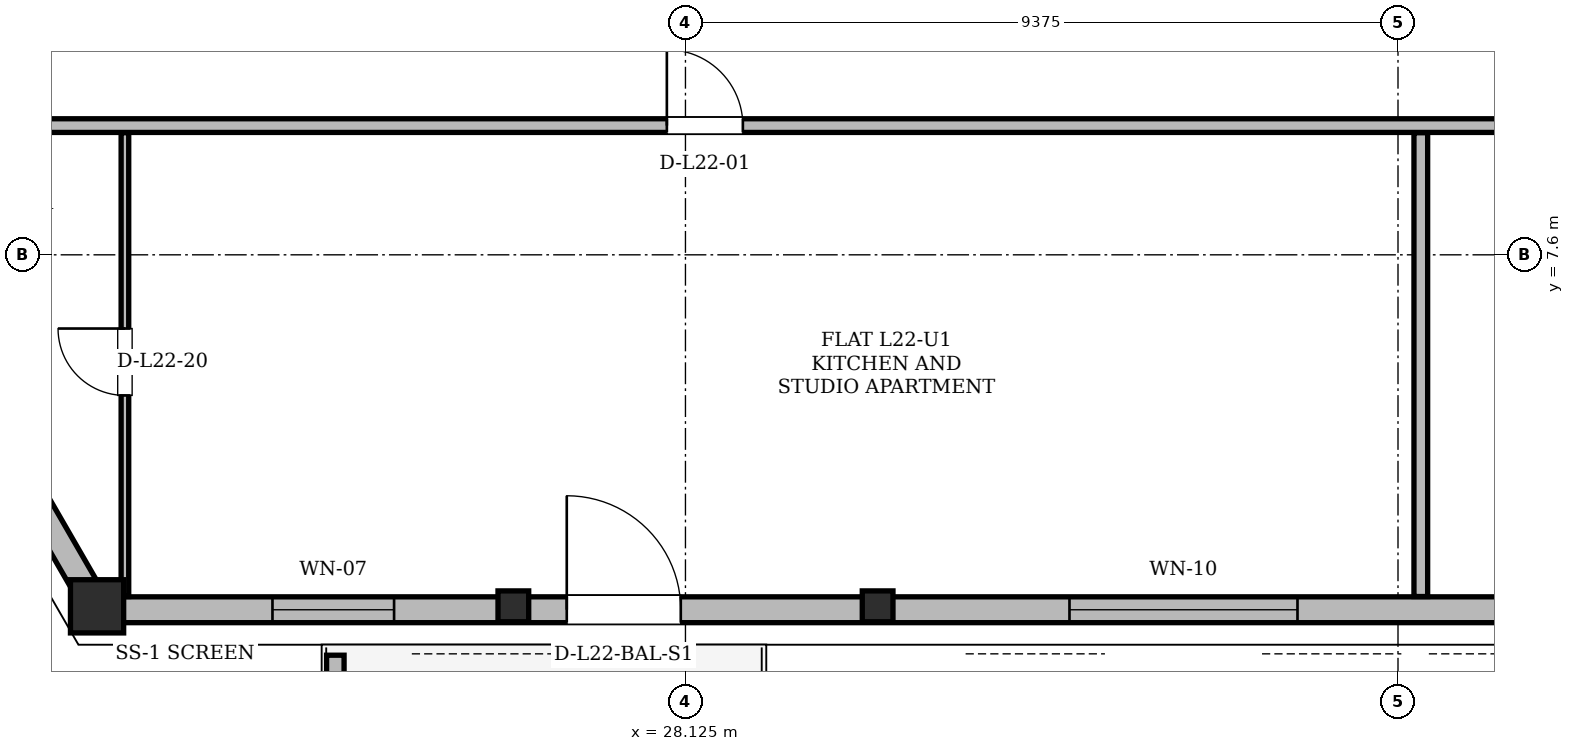
"""IFC4 building model, lengths in metres.
Left out: names, types, materials, properties, quantities, classifications, styles, units other than length and angle.
Written with IfcOpenShell. Run it as: python <this file> out.ifc"""

import sys

from ifc_helpers import new_model, si_unit, direction, frame, frame_2d, origin, origin_2d, place, context, subcontext, project, spatial, polyline, rectangle, hollow_rectangle, i_section, outline, extrude, element, fill, save


model = new_model("IFC4")
c1 = context("Model", 3, precision=1e-05, world=origin(), true_north=direction((0.0, 1.0)))
c2 = subcontext(c1, "Body", "Model", "MODEL_VIEW")
j1 = project(units=[si_unit("LENGTHUNIT", "METRE"), si_unit("PLANEANGLEUNIT", "RADIAN")], contexts=[c1])
p1 = place(None, origin())
s1 = spatial("IfcSite", under=j1, at=p1, CompositionType="ELEMENT")
p2 = place(p1, origin())
s2 = spatial("IfcBuilding", under=s1, at=p2, CompositionType="ELEMENT")
p3 = place(p2, frame((0.0, 0.0, 86.1)))
s3 = spatial("IfcBuildingStorey", under=s2, at=p3, CompositionType="ELEMENT", Elevation=86.1)
p4 = place(p3, frame((20.404, 2.93, 0.004), z_axis=(-0.011485192909, 0.02507713718, 0.999619541393), x_axis=(-0.909181442801, -0.41640017299, 0.0)))
e1 = element("IfcColumn", 1, at=p4, inside=s3, PredefinedType="COLUMN", context=c2, shape_type="SweptSolid", body=[
    extrude(hollow_rectangle(XDim=0.7, YDim=0.7, WallThickness=0.055, at=origin_2d()), origin(), (0.0, 0.0, 1.0), 3.593),
])
for number, where, z_axis, x_axis in (
    (2, (25.875, 2.93, 0.004), (-0.008, 0.025, 1.0), (-0.955, -0.298, 0.0)),
    (3, (30.662, 2.93, 0.004), (-0.005, 0.025, 1.0), (-0.983, -0.181, 0.0)),
):
    element("IfcColumn", number, at=place(p3, frame(where, z_axis=z_axis, x_axis=x_axis)), inside=s3, PredefinedType="COLUMN", context=c2, shape_type="SweptSolid", body=[
        extrude(i_section(OverallWidth=0.404, OverallDepth=0.406, WebThickness=0.027, FlangeThickness=0.044, at=origin_2d()), origin(), (0.0, 0.0, 1.0), 3.592),
    ])
p5 = place(p3, frame((14.083, 13.879, 0.0), z_axis=(0.0, 0.0, 1.0), x_axis=(0.499993808156, -0.866028978618, 0.0)))
e4 = element("IfcWall", 4, at=p5, inside=s3, PredefinedType="SOLIDWALL", context=c2, shape_type="SweptSolid", body=[
    extrude(rectangle(XDim=12.643, YDim=0.34, at=frame_2d((6.321, 0.0))), origin(), (0.0, 0.0, 1.0), 2.578),
])
p6 = place(p3, frame((20.404, 2.93, 0.0), z_axis=(0.0, 0.0, 1.0), x_axis=(1.0, 0.0, 0.0)))
e5 = element("IfcWall", 5, at=p6, inside=s3, PredefinedType="SOLIDWALL", context=c2, shape_type="SweptSolid", body=[
    extrude(rectangle(XDim=34.192, YDim=0.34, at=frame_2d((17.096, 0.0))), origin(), (0.0, 0.0, 1.0), 2.578),
])
p7 = place(p6, frame((6.159, 0.0, 0.0)))
e6 = element("IfcOpeningElement", 6, at=p7, cuts=e5, PredefinedType="OPENING", context=c2, shape_type="SweptSolid", body=[
    extrude(rectangle(XDim=1.5, YDim=2.2, at=frame_2d((0.75, 1.1))), frame((0.0, 0.17, 0.0), z_axis=(0.0, -1.0, 0.0), x_axis=(1.0, 0.0, 0.0)), (0.0, 0.0, 1.0), 0.34),
])
p8 = place(p6, frame((24.658, 0.0, 0.0)))
e7 = element("IfcOpeningElement", 7, at=p8, cuts=e5, PredefinedType="OPENING", context=c2, shape_type="SweptSolid", body=[
    extrude(rectangle(XDim=1.5, YDim=2.2, at=frame_2d((0.75, 1.1))), frame((0.0, 0.17, 0.0), z_axis=(0.0, -1.0, 0.0), x_axis=(1.0, 0.0, 0.0)), (0.0, 0.0, 1.0), 0.34),
])
p9 = place(p6, frame((2.287, 0.0, 0.85)))
e8 = element("IfcOpeningElement", 8, at=p9, cuts=e5, PredefinedType="OPENING", context=c2, shape_type="SweptSolid", body=[
    extrude(rectangle(XDim=1.6, YDim=1.618, at=frame_2d((0.8, 0.809))), frame((0.0, 0.17, 0.0), z_axis=(0.0, -1.0, 0.0), x_axis=(1.0, 0.0, 0.0)), (0.0, 0.0, 1.0), 0.34),
])
p10 = place(p6, frame((12.774, 0.0, 0.85)))
e9 = element("IfcOpeningElement", 9, at=p10, cuts=e5, PredefinedType="OPENING", context=c2, shape_type="SweptSolid", body=[
    extrude(rectangle(XDim=3.0, YDim=1.618, at=frame_2d((1.5, 0.809))), frame((0.0, 0.17, 0.0), z_axis=(0.0, -1.0, 0.0), x_axis=(1.0, 0.0, 0.0)), (0.0, 0.0, 1.0), 0.34),
])
p11 = place(p6, frame((19.768, 0.0, 0.85)))
e10 = element("IfcOpeningElement", 10, at=p11, cuts=e5, PredefinedType="OPENING", context=c2, shape_type="SweptSolid", body=[
    extrude(rectangle(XDim=1.2, YDim=1.48, at=frame_2d((0.6, 0.74))), frame((0.0, 0.17, 0.0), z_axis=(0.0, -1.0, 0.0), x_axis=(1.0, 0.0, 0.0)), (0.0, 0.0, 1.0), 0.34),
])
p12 = place(p6, frame((29.48, 0.0, 0.85)))
e11 = element("IfcOpeningElement", 11, at=p12, cuts=e5, PredefinedType="OPENING", context=c2, shape_type="SweptSolid", body=[
    extrude(rectangle(XDim=2.8, YDim=1.618, at=frame_2d((1.4, 0.809))), frame((0.0, 0.17, 0.0), z_axis=(0.0, -1.0, 0.0), x_axis=(1.0, 0.0, 0.0)), (0.0, 0.0, 1.0), 0.34),
])
p13 = place(p3, frame((23.518, 2.333, 0.0), z_axis=(0.0, 0.0, 1.0), x_axis=(0.0, -1.0, 0.0)))
e12 = element("IfcWall", 12, at=p13, inside=s3, PredefinedType="PARAPET", context=c2, shape_type="SweptSolid", body=[
    extrude(outline(polyline([(0.0, 0.0), (2.042, 0.0), (2.042, 1.1), (0.0, 1.32), (0.0, 0.0)])), frame((0.0, 0.115, 0.0), z_axis=(0.0, -1.0, 0.0), x_axis=(1.0, 0.0, 0.0)), (0.0, 0.0, 1.0), 0.23),
])
p14 = place(p3, frame((19.2, 9.3, 0.0), z_axis=(0.0, 0.0, 1.0), x_axis=(1.0, 0.0, 0.0)))
e13 = element("IfcWall", 13, at=p14, inside=s3, PredefinedType="PARTITIONING", context=c2, shape_type="SweptSolid", body=[
    extrude(rectangle(XDim=36.6, YDim=0.18, at=frame_2d((18.3, 0.0))), origin(), (0.0, 0.0, 1.0), 2.814),
])
p15 = place(p14, frame((8.68, 0.0, 0.0)))
e14 = element("IfcOpeningElement", 14, at=p15, cuts=e13, PredefinedType="OPENING", context=c2, shape_type="SweptSolid", body=[
    extrude(rectangle(XDim=1.0, YDim=2.18, at=frame_2d((0.5, 1.09))), frame((0.0, 0.09, 0.0), z_axis=(0.0, -1.0, 0.0), x_axis=(1.0, 0.0, 0.0)), (0.0, 0.0, 1.0), 0.18),
])
p16 = place(p14, frame((26.865, 0.0, 0.0)))
e15 = element("IfcOpeningElement", 15, at=p16, cuts=e13, PredefinedType="OPENING", context=c2, shape_type="SweptSolid", body=[
    extrude(rectangle(XDim=1.0, YDim=2.18, at=frame_2d((0.5, 1.09))), frame((0.0, 0.09, 0.0), z_axis=(0.0, -1.0, 0.0), x_axis=(1.0, 0.0, 0.0)), (0.0, 0.0, 1.0), 0.18),
])
p17 = place(p3, frame((20.75, 3.104, 0.0), z_axis=(0.0, 0.0, 1.0), x_axis=(0.0, 1.0, 0.0)))
e16 = element("IfcWall", 16, at=p17, inside=s3, PredefinedType="PARTITIONING", context=c2, shape_type="SweptSolid", body=[
    extrude(rectangle(XDim=6.102, YDim=0.1, at=frame_2d((3.051, 0.0))), origin(), (0.0, 0.0, 1.0), 2.814),
])
p18 = place(p17, frame((2.646, 0.0, 0.0)))
e17 = element("IfcOpeningElement", 17, at=p18, cuts=e16, PredefinedType="OPENING", context=c2, shape_type="SweptSolid", body=[
    extrude(rectangle(XDim=0.88, YDim=2.08, at=frame_2d((0.44, 1.04))), frame((0.0, 0.05, 0.0), z_axis=(0.0, -1.0, 0.0), x_axis=(1.0, 0.0, 0.0)), (0.0, 0.0, 1.0), 0.1),
])
p19 = place(p3, frame((37.8, 3.104, 0.0), z_axis=(0.0, 0.0, 1.0), x_axis=(0.0, 1.0, 0.0)))
e18 = element("IfcWall", 18, at=p19, inside=s3, PredefinedType="PARTITIONING", context=c2, shape_type="SweptSolid", body=[
    extrude(rectangle(XDim=6.102, YDim=0.18, at=frame_2d((3.051, 0.0))), origin(), (0.0, 0.0, 1.0), 3.36),
])
p20 = place(p7, origin())
e19 = element("IfcDoor", 19, at=p20, inside=s3, OperationType="SINGLE_SWING_LEFT", PredefinedType="DOOR", context=c2, shape_type="SweptSolid", body=[
    extrude(rectangle(XDim=1.5, YDim=2.2, at=frame_2d((0.75, 1.1))), frame((0.0, 0.025, 0.0), z_axis=(0.0, -1.0, 0.0), x_axis=(1.0, 0.0, 0.0)), (0.0, 0.0, 1.0), 0.05),
])
fill(e6, e19)
p21 = place(p9, origin())
e20 = element("IfcWindow", 20, at=p21, inside=s3, PartitioningType="SINGLE_PANEL", PredefinedType="WINDOW", context=c2, shape_type="SweptSolid", body=[
    extrude(rectangle(XDim=1.6, YDim=1.618, at=frame_2d((0.8, 0.809))), frame((0.0, 0.03, 0.0), z_axis=(0.0, -1.0, 0.0), x_axis=(1.0, 0.0, 0.0)), (0.0, 0.0, 1.0), 0.06),
])
fill(e8, e20)
p22 = place(p10, origin())
e21 = element("IfcWindow", 21, at=p22, inside=s3, PartitioningType="SINGLE_PANEL", PredefinedType="WINDOW", context=c2, shape_type="SweptSolid", body=[
    extrude(rectangle(XDim=3.0, YDim=1.618, at=frame_2d((1.5, 0.809))), frame((0.0, 0.03, 0.0), z_axis=(0.0, -1.0, 0.0), x_axis=(1.0, 0.0, 0.0)), (0.0, 0.0, 1.0), 0.06),
])
fill(e9, e21)
p23 = place(p15, origin())
e22 = element("IfcDoor", 22, at=p23, inside=s3, OperationType="SINGLE_SWING_LEFT", PredefinedType="DOOR", context=c2, shape_type="SweptSolid", body=[
    extrude(rectangle(XDim=1.0, YDim=2.18, at=frame_2d((0.5, 1.09))), frame((0.0, 0.025, 0.0), z_axis=(0.0, -1.0, 0.0), x_axis=(1.0, 0.0, 0.0)), (0.0, 0.0, 1.0), 0.05),
])
fill(e14, e22)
p24 = place(p18, origin())
e23 = element("IfcDoor", 23, at=p24, inside=s3, OperationType="SINGLE_SWING_RIGHT", PredefinedType="DOOR", context=c2, shape_type="SweptSolid", body=[
    extrude(rectangle(XDim=0.88, YDim=2.08, at=frame_2d((0.44, 1.04))), frame((0.0, 0.025, 0.0), z_axis=(0.0, -1.0, 0.0), x_axis=(1.0, 0.0, 0.0)), (0.0, 0.0, 1.0), 0.05),
])
fill(e17, e23)
save(model, sys.argv[1])
